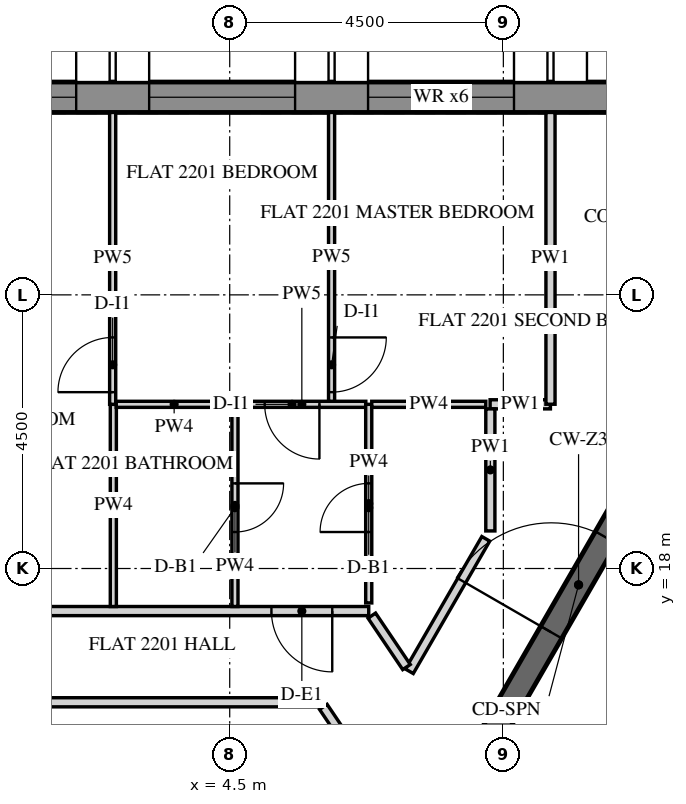
"""IFC4 building model, lengths in metres.
Left out: names, types, materials, properties, quantities, classifications, styles, units other than length and angle.
Written with IfcOpenShell. Run it as: python <this file> out.ifc"""

import sys

from ifc_helpers import new_model, si_unit, direction, frame, frame_2d, origin, place, context, subcontext, project, spatial, polyline, rectangle, outline, extrude, element, fill, save


model = new_model("IFC4")
c1 = context("Model", 3, precision=1e-05, world=origin(), true_north=direction((0.0, 1.0)))
c2 = subcontext(c1, "Body", "Model", "MODEL_VIEW")
j1 = project(units=[si_unit("LENGTHUNIT", "METRE"), si_unit("PLANEANGLEUNIT", "RADIAN")], contexts=[c1])
p1 = place(None, origin())
s1 = spatial("IfcSite", under=j1, at=p1, CompositionType="ELEMENT")
p2 = place(p1, origin())
s2 = spatial("IfcBuilding", under=s1, at=p2, CompositionType="ELEMENT")
p3 = place(p2, frame((0.0, 0.0, 279.6)))
s3 = spatial("IfcBuildingStorey", under=s2, at=p3, CompositionType="ELEMENT", Elevation=279.6)
p4 = place(p3, frame((11.698, 25.75, -0.15), z_axis=(0.0, 0.0, 1.0), x_axis=(-1.0, 0.0, 0.0)))
e1 = element("IfcWall", 1, at=p4, inside=s3, PredefinedType="SOLIDWALL", context=c2, shape_type="SweptSolid", body=[
    extrude(outline(polyline([(-0.021, -0.25), (25.468, -0.25), (25.421, 0.25), (0.021, 0.25), (-0.021, -0.25)])), origin(), (0.0, 0.0, 1.0), 3.9),
])
p5 = place(p4, frame((2.522, 0.0, 0.75)))
e2 = element("IfcOpeningElement", 2, at=p5, cuts=e1, PredefinedType="OPENING", context=c2, shape_type="SweptSolid", body=[
    extrude(rectangle(XDim=2.4, YDim=2.7, at=frame_2d((1.2, 1.35))), frame((0.0, 0.26, 0.0), z_axis=(0.0, -1.0, 0.0), x_axis=(1.0, 0.0, 0.0)), (0.0, 0.0, 1.0), 0.52),
])
p6 = place(p4, frame((6.122, 0.0, 0.75)))
e3 = element("IfcOpeningElement", 3, at=p6, cuts=e1, PredefinedType="OPENING", context=c2, shape_type="SweptSolid", body=[
    extrude(rectangle(XDim=2.4, YDim=2.7, at=frame_2d((1.2, 1.35))), frame((0.0, 0.26, 0.0), z_axis=(0.0, -1.0, 0.0), x_axis=(1.0, 0.0, 0.0)), (0.0, 0.0, 1.0), 0.52),
])
p7 = place(p4, frame((9.722, 0.0, 0.75)))
e4 = element("IfcOpeningElement", 4, at=p7, cuts=e1, PredefinedType="OPENING", context=c2, shape_type="SweptSolid", body=[
    extrude(rectangle(XDim=2.4, YDim=2.7, at=frame_2d((1.2, 1.35))), frame((0.0, 0.26, 0.0), z_axis=(0.0, -1.0, 0.0), x_axis=(1.0, 0.0, 0.0)), (0.0, 0.0, 1.0), 0.52),
])
p8 = place(p4, frame((13.323, 0.0, 0.75)))
e5 = element("IfcOpeningElement", 5, at=p8, cuts=e1, PredefinedType="OPENING", context=c2, shape_type="SweptSolid", body=[
    extrude(rectangle(XDim=2.4, YDim=2.7, at=frame_2d((1.2, 1.35))), frame((0.0, 0.26, 0.0), z_axis=(0.0, -1.0, 0.0), x_axis=(1.0, 0.0, 0.0)), (0.0, 0.0, 1.0), 0.52),
])
p9 = place(p4, frame((16.922, 0.0, 0.75)))
e6 = element("IfcOpeningElement", 6, at=p9, cuts=e1, PredefinedType="OPENING", context=c2, shape_type="SweptSolid", body=[
    extrude(rectangle(XDim=2.4, YDim=2.7, at=frame_2d((1.2, 1.35))), frame((0.0, 0.26, 0.0), z_axis=(0.0, -1.0, 0.0), x_axis=(1.0, 0.0, 0.0)), (0.0, 0.0, 1.0), 0.52),
])
p10 = place(p4, frame((20.522, 0.0, 0.75)))
e7 = element("IfcOpeningElement", 7, at=p10, cuts=e1, PredefinedType="OPENING", context=c2, shape_type="SweptSolid", body=[
    extrude(rectangle(XDim=2.4, YDim=2.7, at=frame_2d((1.2, 1.35))), frame((0.0, 0.26, 0.0), z_axis=(0.0, -1.0, 0.0), x_axis=(1.0, 0.0, 0.0)), (0.0, 0.0, 1.0), 0.52),
])
p11 = place(p3, frame((6.351, 11.0, -0.15), z_axis=(0.0, 0.0, 1.0), x_axis=(0.499998894578, 0.866026041999, 0.0)))
e8 = element("IfcWall", 8, at=p11, inside=s3, PredefinedType="SHEAR", context=c2, shape_type="SweptSolid", body=[
    extrude(rectangle(XDim=15.544, YDim=0.4, at=frame_2d((7.772, 0.0))), origin(), (0.0, 0.0, 1.0), 3.9),
])
p12 = place(p11, frame((6.872, 0.0, 0.15)))
e9 = element("IfcOpeningElement", 9, at=p12, cuts=e8, PredefinedType="OPENING", context=c2, shape_type="SweptSolid", body=[
    extrude(rectangle(XDim=1.8, YDim=2.4, at=frame_2d((0.9, 1.2))), frame((0.0, 0.21, 0.0), z_axis=(0.0, -1.0, 0.0), x_axis=(1.0, 0.0, 0.0)), (0.0, 0.0, 1.0), 0.42),
])
p13 = place(p3, frame((6.786, 17.3, 0.0), z_axis=(0.0, 0.0, 1.0), x_axis=(-1.0, 0.0, 0.0)))
e10 = element("IfcWall", 10, at=p13, inside=s3, PredefinedType="PARTITIONING", context=c2, shape_type="SweptSolid", body=[
    extrude(rectangle(XDim=15.371, YDim=0.15, at=frame_2d((7.686, 0.0))), origin(), (0.0, 0.0, 1.0), 2.988),
])
p14 = place(p13, frame((0.6, 0.0, 0.0)))
e11 = element("IfcOpeningElement", 11, at=p14, cuts=e10, PredefinedType="OPENING", context=c2, shape_type="SweptSolid", body=[
    extrude(rectangle(XDim=1.0, YDim=2.1, at=frame_2d((0.5, 1.05))), frame((0.0, 0.085, 0.0), z_axis=(0.0, -1.0, 0.0), x_axis=(1.0, 0.0, 0.0)), (0.0, 0.0, 1.0), 0.17),
])
p15 = place(p13, frame((14.211, 0.0, 0.0)))
e12 = element("IfcOpeningElement", 12, at=p15, cuts=e10, PredefinedType="OPENING", context=c2, shape_type="SweptSolid", body=[
    extrude(rectangle(XDim=1.0, YDim=2.1, at=frame_2d((0.5, 1.05))), frame((0.0, 0.085, 0.0), z_axis=(0.0, -1.0, 0.0), x_axis=(1.0, 0.0, 0.0)), (0.0, 0.0, 1.0), 0.17),
])
p16 = place(p3, frame((9.774, 20.7, 0.0), z_axis=(0.0, 0.0, 1.0), x_axis=(-1.0, 0.0, 0.0)))
e13 = element("IfcWall", 13, at=p16, inside=s3, PredefinedType="PARTITIONING", context=c2, shape_type="SweptSolid", body=[
    extrude(rectangle(XDim=0.991, YDim=0.15, at=frame_2d((0.496, 0.0))), origin(), (0.0, 0.0, 1.0), 2.988),
])
p17 = place(p3, frame((9.775, 25.5, 0.0), z_axis=(0.0, 0.0, 1.0), x_axis=(0.0, -1.0, 0.0)))
e14 = element("IfcWall", 14, at=p17, inside=s3, PredefinedType="PARTITIONING", context=c2, shape_type="SweptSolid", body=[
    extrude(rectangle(XDim=4.799, YDim=0.15, at=frame_2d((2.399, 0.0))), origin(), (0.0, 0.0, 1.0), 2.988),
])
p18 = place(p3, frame((8.786, 20.625, 0.0), z_axis=(0.0, 0.0, 1.0), x_axis=(0.0, -1.0, 0.0)))
e15 = element("IfcWall", 15, at=p18, inside=s3, PredefinedType="PARTITIONING", context=c2, shape_type="SweptSolid", body=[
    extrude(rectangle(XDim=2.007, YDim=0.15, at=frame_2d((1.003, 0.0))), origin(), (0.0, 0.0, 1.0), 2.988),
])
p19 = place(p3, frame((8.711, 18.488, 0.0), z_axis=(0.0, 0.0, 1.0), x_axis=(-0.500075402517, -0.865981865744, 0.0)))
e16 = element("IfcWall", 16, at=p19, inside=s3, PredefinedType="PARTITIONING", context=c2, shape_type="SweptSolid", body=[
    extrude(rectangle(XDim=2.515, YDim=0.15, at=frame_2d((1.257, 0.0))), origin(), (0.0, 0.0, 1.0), 2.988),
])
p20 = place(p3, frame((7.407, 16.379, 0.0), z_axis=(0.0, 0.0, 1.0), x_axis=(-0.559111060147, 0.829092770697, 0.0)))
e17 = element("IfcWall", 17, at=p20, inside=s3, PredefinedType="PARTITIONING", context=c2, shape_type="SweptSolid", body=[
    extrude(rectangle(XDim=1.02, YDim=0.15, at=frame_2d((0.51, 0.0))), origin(), (0.0, 0.0, 1.0), 2.988),
])
p21 = place(p3, frame((-7.564, 15.8, 0.0), z_axis=(0.0, 0.0, 1.0), x_axis=(1.0, 0.0, 0.0)))
e18 = element("IfcWall", 18, at=p21, inside=s3, PredefinedType="PARTITIONING", context=c2, shape_type="SweptSolid", body=[
    extrude(rectangle(XDim=13.553, YDim=0.15, at=frame_2d((6.776, 0.0))), origin(), (0.0, 0.0, 1.0), 2.988),
])
p22 = place(p21, frame((6.326, 0.0, 0.0)))
e19 = element("IfcOpeningElement", 19, at=p22, cuts=e18, PredefinedType="OPENING", context=c2, shape_type="SweptSolid", body=[
    extrude(rectangle(XDim=0.9, YDim=2.1, at=frame_2d((0.45, 1.05))), frame((0.0, 0.085, 0.0), z_axis=(0.0, -1.0, 0.0), x_axis=(1.0, 0.0, 0.0)), (0.0, 0.0, 1.0), 0.17),
])
p23 = place(p3, frame((6.039, 15.725, 0.0), z_axis=(0.0, 0.0, 1.0), x_axis=(0.559307154107, -0.828960498073, 0.0)))
e20 = element("IfcWall", 20, at=p23, inside=s3, PredefinedType="PARTITIONING", context=c2, shape_type="SweptSolid", body=[
    extrude(rectangle(XDim=1.038, YDim=0.15, at=frame_2d((0.519, 0.0))), origin(), (0.0, 0.0, 1.0), 2.988),
])
p24 = place(p3, frame((9.611, 13.246, 0.0), z_axis=(0.0, 0.0, 1.0), x_axis=(0.499994435258, 0.866028616566, 0.0)))
e21 = element("IfcWall", 21, at=p24, inside=s3, PredefinedType="PARTITIONING", context=c2, shape_type="SweptSolid", body=[
    extrude(rectangle(XDim=7.097, YDim=0.15, at=frame_2d((3.548, 0.0))), origin(), (0.0, 0.0, 1.0), 2.988),
])
p25 = place(p3, frame((2.586, 17.375, 0.0), z_axis=(0.0, 0.0, 1.0), x_axis=(0.0, 1.0, 0.0)))
e22 = element("IfcWall", 22, at=p25, inside=s3, PredefinedType="PARTITIONING", context=c2, shape_type="SweptSolid", body=[
    extrude(rectangle(XDim=3.325, YDim=0.1, at=frame_2d((1.663, 0.0))), origin(), (0.0, 0.0, 1.0), 2.988),
])
p26 = place(p3, frame((2.575, 20.7, 0.0), z_axis=(0.0, 0.0, 1.0), x_axis=(0.0, 1.0, 0.0)))
e23 = element("IfcWall", 23, at=p26, inside=s3, PredefinedType="PARTITIONING", context=c2, shape_type="SweptSolid", body=[
    extrude(rectangle(XDim=4.8, YDim=0.1, at=frame_2d((2.4, 0.0))), origin(), (0.0, 0.0, 1.0), 2.988),
])
p27 = place(p26, frame((0.2, 0.0, 0.0)))
e24 = element("IfcOpeningElement", 24, at=p27, cuts=e23, PredefinedType="OPENING", context=c2, shape_type="SweptSolid", body=[
    extrude(rectangle(XDim=0.9, YDim=2.1, at=frame_2d((0.45, 1.05))), frame((0.0, 0.06, 0.0), z_axis=(0.0, -1.0, 0.0), x_axis=(1.0, 0.0, 0.0)), (0.0, 0.0, 1.0), 0.12),
])
p28 = place(p3, frame((4.586, 20.7, 0.0), z_axis=(0.0, 0.0, 1.0), x_axis=(0.0, -1.0, 0.0)))
e25 = element("IfcWall", 25, at=p28, inside=s3, PredefinedType="PARTITIONING", context=c2, shape_type="SweptSolid", body=[
    extrude(rectangle(XDim=3.325, YDim=0.1, at=frame_2d((1.663, 0.0))), origin(), (0.0, 0.0, 1.0), 2.988),
])
p29 = place(p28, frame((1.3, 0.0, 0.0)))
e26 = element("IfcOpeningElement", 26, at=p29, cuts=e25, PredefinedType="OPENING", context=c2, shape_type="SweptSolid", body=[
    extrude(rectangle(XDim=0.8, YDim=2.1, at=frame_2d((0.4, 1.05))), frame((0.0, 0.06, 0.0), z_axis=(0.0, -1.0, 0.0), x_axis=(1.0, 0.0, 0.0)), (0.0, 0.0, 1.0), 0.12),
])
p30 = place(p3, frame((6.738, 20.7, 0.0), z_axis=(0.0, 0.0, 1.0), x_axis=(-1.0, 0.0, 0.0)))
e27 = element("IfcWall", 27, at=p30, inside=s3, PredefinedType="PARTITIONING", context=c2, shape_type="SweptSolid", body=[
    extrude(rectangle(XDim=2.104, YDim=0.1, at=frame_2d((1.052, 0.0))), origin(), (0.0, 0.0, 1.0), 2.988),
])
p31 = place(p30, frame((0.763, 0.0, 0.0)))
e28 = element("IfcOpeningElement", 28, at=p31, cuts=e27, PredefinedType="OPENING", context=c2, shape_type="SweptSolid", body=[
    extrude(rectangle(XDim=0.9, YDim=2.1, at=frame_2d((0.45, 1.05))), frame((0.0, 0.06, 0.0), z_axis=(0.0, -1.0, 0.0), x_axis=(1.0, 0.0, 0.0)), (0.0, 0.0, 1.0), 0.12),
])
p32 = place(p3, frame((6.786, 17.434, 0.0), z_axis=(0.0, 0.0, 1.0), x_axis=(0.0, 1.0, 0.0)))
e29 = element("IfcWall", 29, at=p32, inside=s3, PredefinedType="PARTITIONING", context=c2, shape_type="SweptSolid", body=[
    extrude(rectangle(XDim=3.266, YDim=0.1, at=frame_2d((1.633, 0.0))), origin(), (0.0, 0.0, 1.0), 2.988),
])
p33 = place(p32, frame((1.166, 0.0, 0.0)))
e30 = element("IfcOpeningElement", 30, at=p33, cuts=e29, PredefinedType="OPENING", context=c2, shape_type="SweptSolid", body=[
    extrude(rectangle(XDim=0.8, YDim=2.1, at=frame_2d((0.4, 1.05))), frame((0.0, 0.06, 0.0), z_axis=(0.0, -1.0, 0.0), x_axis=(1.0, 0.0, 0.0)), (0.0, 0.0, 1.0), 0.12),
])
p34 = place(p3, frame((4.538, 20.7, 0.0), z_axis=(0.0, 0.0, 1.0), x_axis=(-1.0, 0.0, 0.0)))
e31 = element("IfcWall", 31, at=p34, inside=s3, PredefinedType="PARTITIONING", context=c2, shape_type="SweptSolid", body=[
    extrude(rectangle(XDim=1.904, YDim=0.1, at=frame_2d((0.952, 0.0))), origin(), (0.0, 0.0, 1.0), 2.988),
])
p35 = place(p3, frame((6.175, 25.5, 0.0), z_axis=(0.0, 0.0, 1.0), x_axis=(0.0, -1.0, 0.0)))
e32 = element("IfcWall", 32, at=p35, inside=s3, PredefinedType="PARTITIONING", context=c2, shape_type="SweptSolid", body=[
    extrude(rectangle(XDim=4.75, YDim=0.1, at=frame_2d((2.375, 0.0))), origin(), (0.0, 0.0, 1.0), 2.988),
])
p36 = place(p35, frame((3.7, 0.0, 0.0)))
e33 = element("IfcOpeningElement", 33, at=p36, cuts=e32, PredefinedType="OPENING", context=c2, shape_type="SweptSolid", body=[
    extrude(rectangle(XDim=0.9, YDim=2.1, at=frame_2d((0.45, 1.05))), frame((0.0, 0.06, 0.0), z_axis=(0.0, -1.0, 0.0), x_axis=(1.0, 0.0, 0.0)), (0.0, 0.0, 1.0), 0.12),
])
p37 = place(p3, frame((6.836, 20.7, 0.0), z_axis=(0.0, 0.0, 1.0), x_axis=(1.0, 0.0, 0.0)))
e34 = element("IfcWall", 34, at=p37, inside=s3, PredefinedType="PARTITIONING", context=c2, shape_type="SweptSolid", body=[
    extrude(rectangle(XDim=1.875, YDim=0.1, at=frame_2d((0.938, 0.0))), origin(), (0.0, 0.0, 1.0), 2.988),
])
p38 = place(p5, frame((0.0, 0.18, 0.0)))
e35 = element("IfcWindow", 35, at=p38, inside=s3, PartitioningType="DOUBLE_PANEL_VERTICAL", PredefinedType="WINDOW", context=c2, shape_type="SweptSolid", body=[
    extrude(rectangle(XDim=2.4, YDim=2.7, at=frame_2d((1.2, 1.35))), frame((0.0, 0.03, 0.0), z_axis=(0.0, -1.0, 0.0), x_axis=(1.0, 0.0, 0.0)), (0.0, 0.0, 1.0), 0.06),
])
fill(e2, e35)
p39 = place(p6, frame((0.0, 0.18, 0.0)))
e36 = element("IfcWindow", 36, at=p39, inside=s3, PartitioningType="DOUBLE_PANEL_VERTICAL", PredefinedType="WINDOW", context=c2, shape_type="SweptSolid", body=[
    extrude(rectangle(XDim=2.4, YDim=2.7, at=frame_2d((1.2, 1.35))), frame((0.0, 0.03, 0.0), z_axis=(0.0, -1.0, 0.0), x_axis=(1.0, 0.0, 0.0)), (0.0, 0.0, 1.0), 0.06),
])
fill(e3, e36)
p40 = place(p7, frame((0.0, 0.18, 0.0)))
e37 = element("IfcWindow", 37, at=p40, inside=s3, PartitioningType="DOUBLE_PANEL_VERTICAL", PredefinedType="WINDOW", context=c2, shape_type="SweptSolid", body=[
    extrude(rectangle(XDim=2.4, YDim=2.7, at=frame_2d((1.2, 1.35))), frame((0.0, 0.03, 0.0), z_axis=(0.0, -1.0, 0.0), x_axis=(1.0, 0.0, 0.0)), (0.0, 0.0, 1.0), 0.06),
])
fill(e4, e37)
p41 = place(p12, origin())
e38 = element("IfcDoor", 38, at=p41, inside=s3, OperationType="DOUBLE_DOOR_SINGLE_SWING", PredefinedType="DOOR", context=c2, shape_type="SweptSolid", body=[
    extrude(rectangle(XDim=1.8, YDim=2.4, at=frame_2d((0.9, 1.2))), frame((0.0, 0.025, 0.0), z_axis=(0.0, -1.0, 0.0), x_axis=(1.0, 0.0, 0.0)), (0.0, 0.0, 1.0), 0.05),
])
fill(e9, e38)
p42 = place(p14, origin())
e39 = element("IfcDoor", 39, at=p42, inside=s3, OperationType="SINGLE_SWING_LEFT", PredefinedType="DOOR", context=c2, shape_type="SweptSolid", body=[
    extrude(rectangle(XDim=1.0, YDim=2.1, at=frame_2d((0.5, 1.05))), frame((0.0, 0.025, 0.0), z_axis=(0.0, -1.0, 0.0), x_axis=(1.0, 0.0, 0.0)), (0.0, 0.0, 1.0), 0.05),
])
fill(e11, e39)
p43 = place(p29, origin())
e40 = element("IfcDoor", 40, at=p43, inside=s3, OperationType="SINGLE_SWING_LEFT", PredefinedType="DOOR", context=c2, shape_type="SweptSolid", body=[
    extrude(rectangle(XDim=0.8, YDim=2.1, at=frame_2d((0.4, 1.05))), frame((0.0, 0.025, 0.0), z_axis=(0.0, -1.0, 0.0), x_axis=(1.0, 0.0, 0.0)), (0.0, 0.0, 1.0), 0.05),
])
fill(e26, e40)
p44 = place(p31, origin())
e41 = element("IfcDoor", 41, at=p44, inside=s3, OperationType="SINGLE_SWING_RIGHT", PredefinedType="DOOR", context=c2, shape_type="SweptSolid", body=[
    extrude(rectangle(XDim=0.9, YDim=2.1, at=frame_2d((0.45, 1.05))), frame((0.0, 0.025, 0.0), z_axis=(0.0, -1.0, 0.0), x_axis=(1.0, 0.0, 0.0)), (0.0, 0.0, 1.0), 0.05),
])
fill(e28, e41)
p45 = place(p36, origin())
e42 = element("IfcDoor", 42, at=p45, inside=s3, OperationType="SINGLE_SWING_RIGHT", PredefinedType="DOOR", context=c2, shape_type="SweptSolid", body=[
    extrude(rectangle(XDim=0.9, YDim=2.1, at=frame_2d((0.45, 1.05))), frame((0.0, 0.025, 0.0), z_axis=(0.0, -1.0, 0.0), x_axis=(1.0, 0.0, 0.0)), (0.0, 0.0, 1.0), 0.05),
])
fill(e33, e42)
p46 = place(p27, origin())
e43 = element("IfcDoor", 43, at=p46, inside=s3, OperationType="SINGLE_SWING_RIGHT", PredefinedType="DOOR", context=c2, shape_type="SweptSolid", body=[
    extrude(rectangle(XDim=0.9, YDim=2.1, at=frame_2d((0.45, 1.05))), frame((0.0, 0.025, 0.0), z_axis=(0.0, -1.0, 0.0), x_axis=(1.0, 0.0, 0.0)), (0.0, 0.0, 1.0), 0.05),
])
fill(e24, e43)
p47 = place(p33, origin())
e44 = element("IfcDoor", 44, at=p47, inside=s3, OperationType="SINGLE_SWING_RIGHT", PredefinedType="DOOR", context=c2, shape_type="SweptSolid", body=[
    extrude(rectangle(XDim=0.8, YDim=2.1, at=frame_2d((0.4, 1.05))), frame((0.0, 0.025, 0.0), z_axis=(0.0, -1.0, 0.0), x_axis=(1.0, 0.0, 0.0)), (0.0, 0.0, 1.0), 0.05),
])
fill(e30, e44)
save(model, sys.argv[1])
